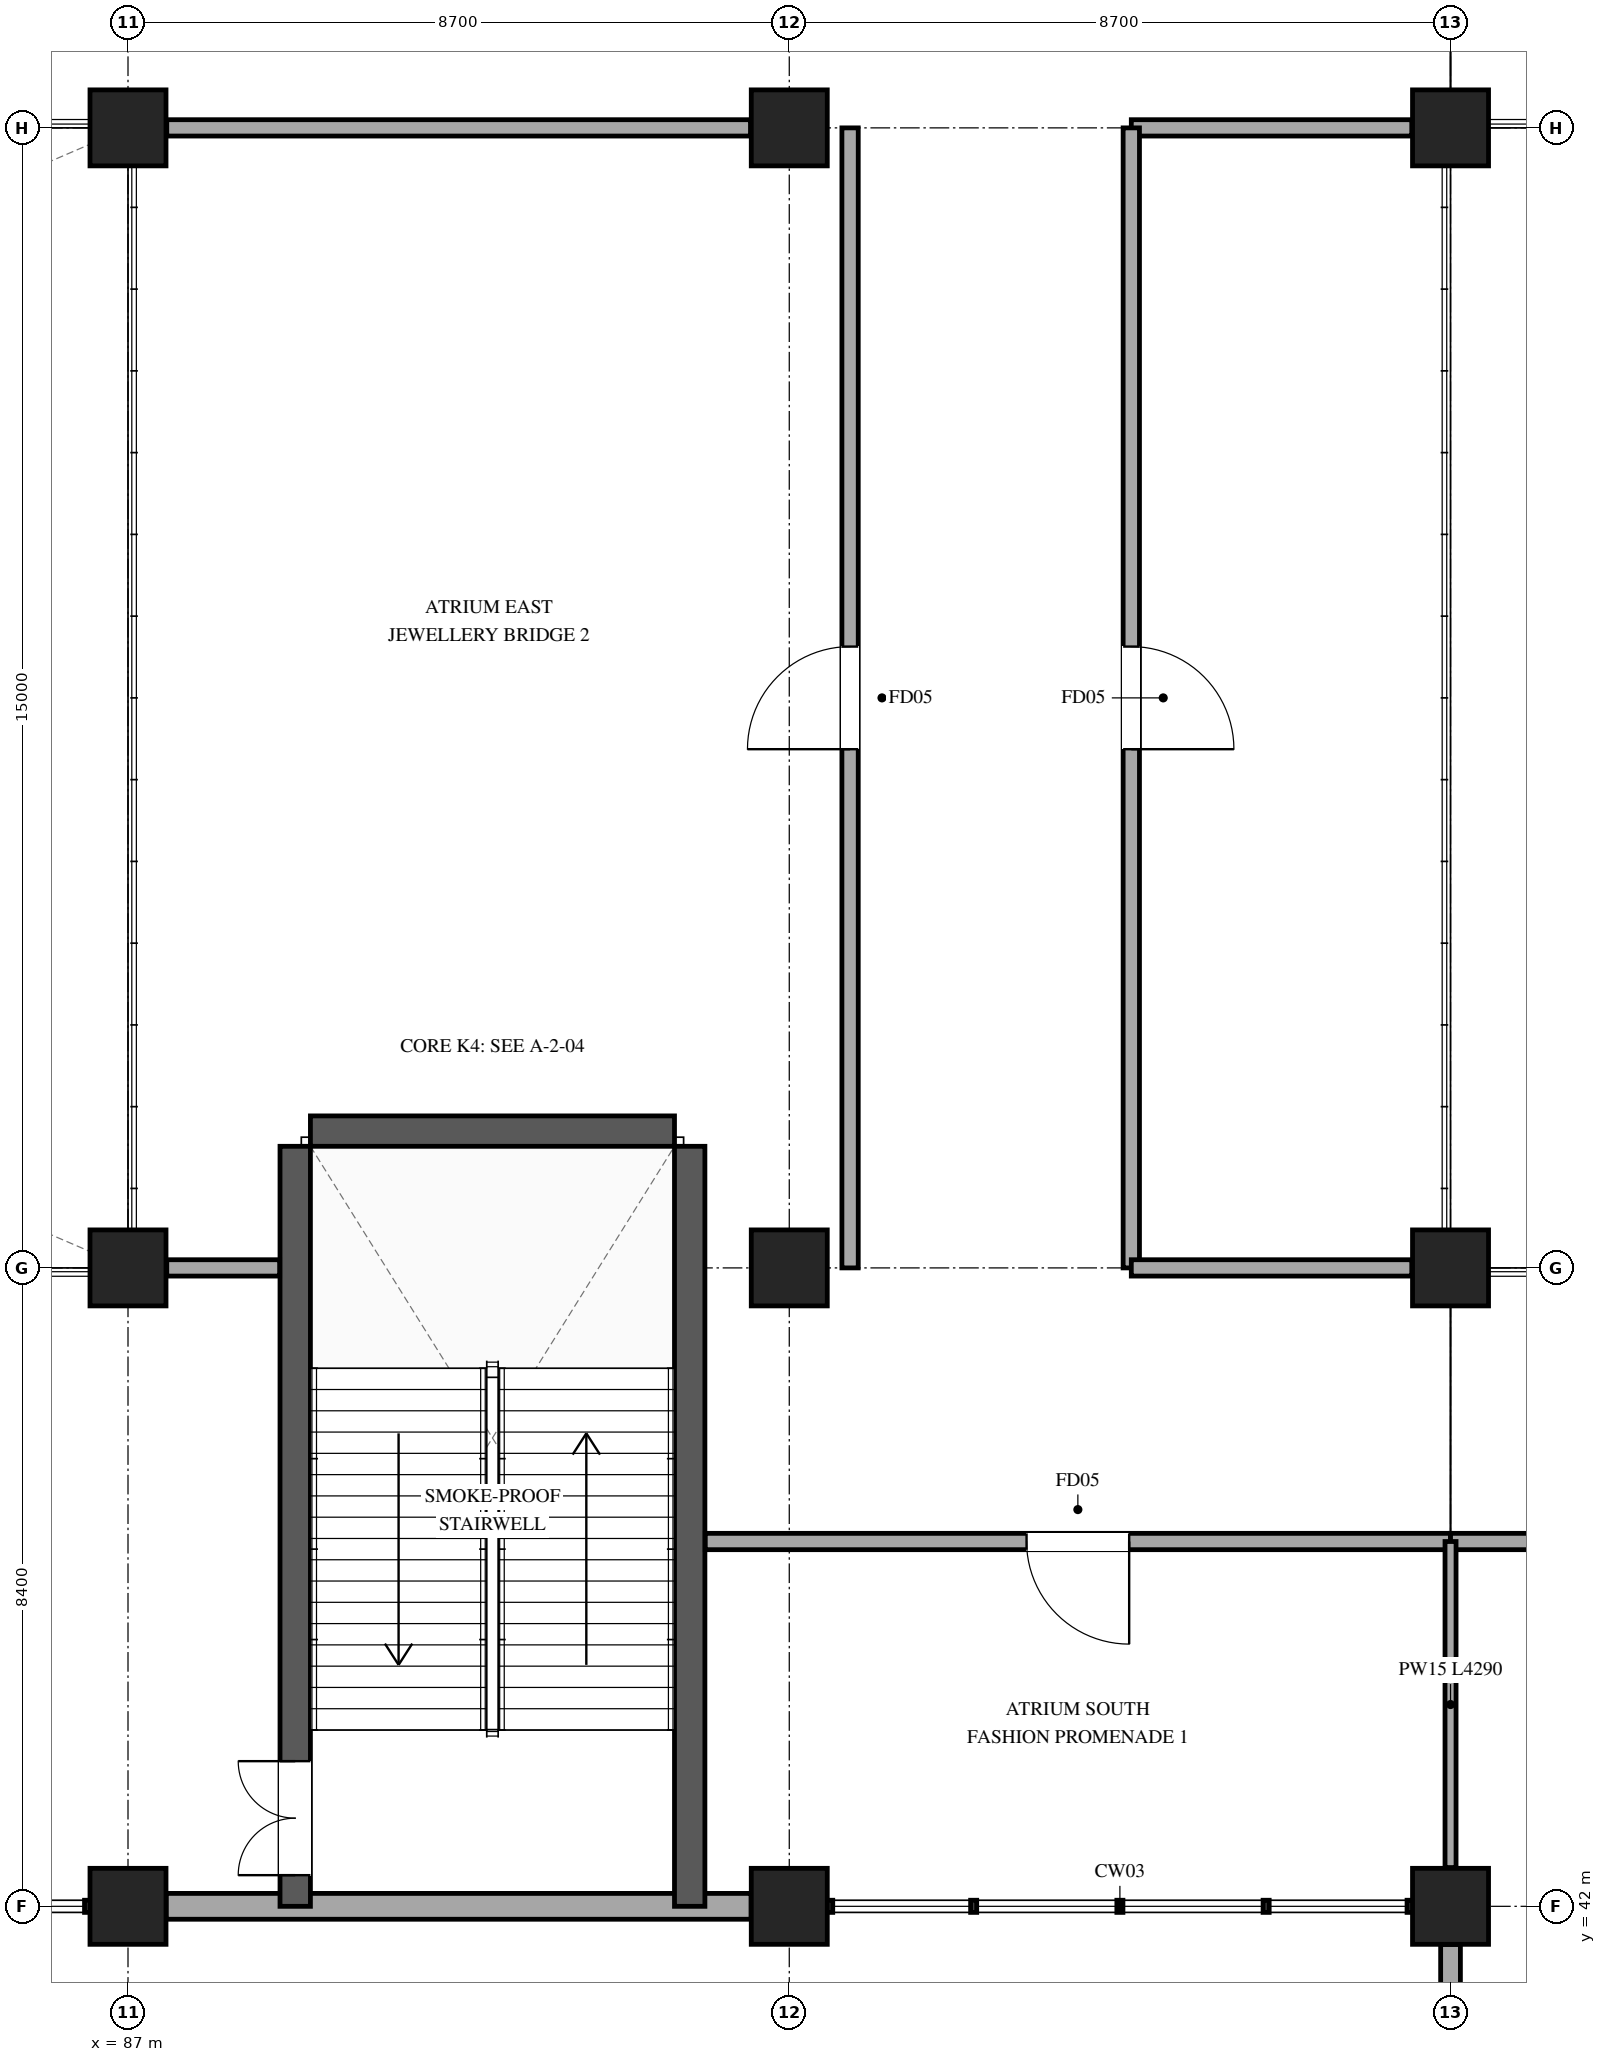
"""IFC4 building model, lengths in metres.
Left out: names, types, materials, properties, quantities, classifications, styles, units other than length and angle.
Written with IfcOpenShell. Run it as: python <this file> out.ifc"""

import sys

from ifc_helpers import new_model, si_unit, direction, frame, frame_2d, origin, origin_2d, place, context, subcontext, project, spatial, rectangle, extrude, element, fill, save


model = new_model("IFC4")
c1 = context("Model", 3, precision=1e-05, world=origin(), true_north=direction((0.0, 1.0)))
c2 = subcontext(c1, "Body", "Model", "MODEL_VIEW")
j1 = project(units=[si_unit("LENGTHUNIT", "METRE"), si_unit("PLANEANGLEUNIT", "RADIAN")], contexts=[c1])
p1 = place(None, origin())
s1 = spatial("IfcSite", under=j1, at=p1, CompositionType="ELEMENT")
p2 = place(p1, origin())
s2 = spatial("IfcBuilding", under=s1, at=p2, CompositionType="ELEMENT")
p3 = place(p2, frame((0.0, 0.0, 6.0)))
s3 = spatial("IfcBuildingStorey", under=s2, at=p3, CompositionType="ELEMENT", Elevation=6.0)
for number, where, z_axis, x_axis in (
    (1, (87.0, 42.0, 0.0), (0.0, 0.0, 1.0), (1.0, 0.0, 0.0)),
    (2, (87.0, 50.4, 0.0), (0.0, 0.0, 1.0), (1.0, 0.0, 0.0)),
    (3, (87.0, 65.4, 0.0), (0.0, 0.0, 1.0), (1.0, 0.0, 0.0)),
    (4, (95.7, 42.0, 0.0), (0.0, 0.0, 1.0), (1.0, 0.0, 0.0)),
    (5, (95.7, 50.4, 0.0), (0.0, 0.0, 1.0), (1.0, 0.0, 0.0)),
    (6, (95.7, 65.4, 0.0), (0.0, 0.0, 1.0), (1.0, 0.0, 0.0)),
    (7, (104.4, 42.0, 0.0), (0.0, 0.0, 1.0), (1.0, 0.0, 0.0)),
    (8, (104.4, 50.4, 0.0), (0.0, 0.0, 1.0), (1.0, 0.0, 0.0)),
    (9, (104.4, 65.4, 0.0), (0.0, 0.0, 1.0), (1.0, 0.0, 0.0)),
):
    element("IfcColumn", number, at=place(p3, frame(where, z_axis=z_axis, x_axis=x_axis)), inside=s3, PredefinedType="COLUMN", context=c2, shape_type="SweptSolid", body=[
        extrude(rectangle(XDim=1.0, YDim=1.0, at=origin_2d()), origin(), (0.0, 0.0, 1.0), 5.4),
    ])
p4 = place(p3, frame((104.4, 34.052, 0.0), z_axis=(0.0, 0.0, 1.0), x_axis=(0.0, 1.0, 0.0)))
e10 = element("IfcWall", 10, at=p4, inside=s3, PredefinedType="STANDARD", context=c2, shape_type="SweptSolid", body=[
    extrude(rectangle(XDim=7.446, YDim=0.26, at=frame_2d((3.723, 0.0))), origin(), (0.0, 0.0, 1.0), 4.455),
])
p5 = place(p4, frame((2.323, 0.0, 0.85)))
e11 = element("IfcOpeningElement", 11, at=p5, cuts=e10, PredefinedType="OPENING", context=c2, shape_type="SweptSolid", body=[
    extrude(rectangle(XDim=2.8, YDim=1.65, at=frame_2d((1.4, 0.825))), frame((0.0, 0.14, 0.0), z_axis=(0.0, -1.0, 0.0), x_axis=(1.0, 0.0, 0.0)), (0.0, 0.0, 1.0), 0.28),
])
p6 = place(p3, frame((95.198, 42.0, 0.0), z_axis=(0.0, 0.0, 1.0), x_axis=(-1.0, 0.0, 0.0)))
e12 = element("IfcWall", 12, at=p6, inside=s3, PredefinedType="STANDARD", context=c2, shape_type="SweptSolid", body=[
    extrude(rectangle(XDim=7.696, YDim=0.34, at=frame_2d((3.848, 0.0))), origin(), (0.0, 0.0, 1.0), 5.09),
])
p7 = place(p3, frame((89.2, 42.0, 0.0), z_axis=(0.0, 0.0, 1.0), x_axis=(0.0, 1.0, 0.0)))
e13 = element("IfcWall", 13, at=p7, inside=s3, PredefinedType="SHEAR", context=c2, shape_type="SweptSolid", body=[
    extrude(rectangle(XDim=10.0, YDim=0.4, at=frame_2d((5.0, 0.0))), origin(), (0.0, 0.0, 1.0), 5.4),
])
p8 = place(p7, frame((0.41, 0.0, 0.0)))
e14 = element("IfcOpeningElement", 14, at=p8, cuts=e13, PredefinedType="OPENING", context=c2, shape_type="SweptSolid", body=[
    extrude(rectangle(XDim=1.5, YDim=2.2, at=frame_2d((0.75, 1.1))), frame((0.0, 0.21, 0.0), z_axis=(0.0, -1.0, 0.0), x_axis=(1.0, 0.0, 0.0)), (0.0, 0.0, 1.0), 0.42),
])
p9 = place(p3, frame((94.39, 52.0, 0.0), z_axis=(0.0, 0.0, 1.0), x_axis=(0.0, -1.0, 0.0)))
e15 = element("IfcWall", 15, at=p9, inside=s3, PredefinedType="SHEAR", context=c2, shape_type="SweptSolid", body=[
    extrude(rectangle(XDim=10.0, YDim=0.4, at=frame_2d((5.0, 0.0))), origin(), (0.0, 0.0, 1.0), 5.4),
])
p10 = place(p3, frame((89.4, 52.2, 0.0), z_axis=(0.0, 0.0, 1.0), x_axis=(1.0, 0.0, 0.0)))
e16 = element("IfcWall", 16, at=p10, inside=s3, PredefinedType="SHEAR", context=c2, shape_type="SweptSolid", body=[
    extrude(rectangle(XDim=4.79, YDim=0.4, at=frame_2d((2.395, 0.0))), origin(), (0.0, 0.0, 1.0), 5.4),
])
p11 = place(p3, frame((104.4, 46.8, 0.0), z_axis=(0.0, 0.0, 1.0), x_axis=(-1.0, 0.0, 0.0)))
e17 = element("IfcWall", 17, at=p11, inside=s3, PredefinedType="PARTITIONING", context=c2, shape_type="SweptSolid", body=[
    extrude(rectangle(XDim=9.805, YDim=0.215, at=frame_2d((4.902, 0.0))), origin(), (0.0, 0.0, 1.0), 4.31),
])
p12 = place(p11, frame((4.228, 0.0, 0.0)))
e18 = element("IfcOpeningElement", 18, at=p12, cuts=e17, PredefinedType="OPENING", context=c2, shape_type="SweptSolid", body=[
    extrude(rectangle(XDim=1.35, YDim=2.2, at=frame_2d((0.675, 1.1))), frame((0.0, 0.118, 0.0), z_axis=(0.0, -1.0, 0.0), x_axis=(1.0, 0.0, 0.0)), (0.0, 0.0, 1.0), 0.235),
])
p13 = place(p3, frame((103.89, 65.4, 0.0), z_axis=(0.0, 0.0, 1.0), x_axis=(-1.0, 0.0, 0.0)))
e19 = element("IfcWall", 19, at=p13, inside=s3, PredefinedType="PARTITIONING", context=c2, shape_type="SweptSolid", body=[
    extrude(rectangle(XDim=3.69, YDim=0.215, at=frame_2d((1.845, 0.0))), origin(), (0.0, 0.0, 1.0), 4.31),
])
p14 = place(p3, frame((100.2, 65.4, 0.0), z_axis=(0.0, 0.0, 1.0), x_axis=(0.0, -1.0, 0.0)))
e20 = element("IfcWall", 20, at=p14, inside=s3, PredefinedType="PARTITIONING", context=c2, shape_type="SweptSolid", body=[
    extrude(rectangle(XDim=15.0, YDim=0.215, at=frame_2d((7.5, 0.0))), origin(), (0.0, 0.0, 1.0), 4.31),
])
p15 = place(p14, frame((6.825, 0.0, 0.0)))
e21 = element("IfcOpeningElement", 21, at=p15, cuts=e20, PredefinedType="OPENING", context=c2, shape_type="SweptSolid", body=[
    extrude(rectangle(XDim=1.35, YDim=2.2, at=frame_2d((0.675, 1.1))), frame((0.0, 0.118, 0.0), z_axis=(0.0, -1.0, 0.0), x_axis=(1.0, 0.0, 0.0)), (0.0, 0.0, 1.0), 0.235),
])
p16 = place(p3, frame((100.2, 50.4, 0.0), z_axis=(0.0, 0.0, 1.0), x_axis=(1.0, 0.0, 0.0)))
e22 = element("IfcWall", 22, at=p16, inside=s3, PredefinedType="PARTITIONING", context=c2, shape_type="SweptSolid", body=[
    extrude(rectangle(XDim=3.69, YDim=0.215, at=frame_2d((1.845, 0.0))), origin(), (0.0, 0.0, 1.0), 4.31),
])
p17 = place(p3, frame((87.51, 50.4, 0.0), z_axis=(0.0, 0.0, 1.0), x_axis=(1.0, 0.0, 0.0)))
e23 = element("IfcWall", 23, at=p17, inside=s3, PredefinedType="PARTITIONING", context=c2, shape_type="SweptSolid", body=[
    extrude(rectangle(XDim=1.485, YDim=0.215, at=frame_2d((0.743, 0.0))), origin(), (0.0, 0.0, 1.0), 5.06),
])
p18 = place(p3, frame((96.5, 50.4, 0.0), z_axis=(0.0, 0.0, 1.0), x_axis=(0.0, 1.0, 0.0)))
e24 = element("IfcWall", 24, at=p18, inside=s3, PredefinedType="PARTITIONING", context=c2, shape_type="SweptSolid", body=[
    extrude(rectangle(XDim=15.0, YDim=0.215, at=frame_2d((7.5, 0.0))), origin(), (0.0, 0.0, 1.0), 4.31),
])
p19 = place(p18, frame((6.825, 0.0, 0.0)))
e25 = element("IfcOpeningElement", 25, at=p19, cuts=e24, PredefinedType="OPENING", context=c2, shape_type="SweptSolid", body=[
    extrude(rectangle(XDim=1.35, YDim=2.2, at=frame_2d((0.675, 1.1))), frame((0.0, 0.118, 0.0), z_axis=(0.0, -1.0, 0.0), x_axis=(1.0, 0.0, 0.0)), (0.0, 0.0, 1.0), 0.235),
])
p20 = place(p3, frame((95.19, 65.4, 0.0), z_axis=(0.0, 0.0, 1.0), x_axis=(-1.0, 0.0, 0.0)))
e26 = element("IfcWall", 26, at=p20, inside=s3, PredefinedType="PARTITIONING", context=c2, shape_type="SweptSolid", body=[
    extrude(rectangle(XDim=7.68, YDim=0.215, at=frame_2d((3.84, 0.0))), origin(), (0.0, 0.0, 1.0), 4.31),
])
p21 = place(p3, frame((114.0, 46.8, 0.0), z_axis=(0.0, 0.0, 1.0), x_axis=(-1.0, 0.0, 0.0)))
e27 = element("IfcWall", 27, at=p21, inside=s3, PredefinedType="PARTITIONING", context=c2, shape_type="SweptSolid", body=[
    extrude(rectangle(XDim=9.6, YDim=0.215, at=frame_2d((4.8, 0.0))), origin(), (0.0, 0.0, 1.0), 4.31),
])
p22 = place(p3, frame((104.4, 46.8, 0.0), z_axis=(0.0, 0.0, 1.0), x_axis=(0.0, -1.0, 0.0)))
e28 = element("IfcWall", 28, at=p22, inside=s3, PredefinedType="PARTITIONING", context=c2, shape_type="SweptSolid", body=[
    extrude(rectangle(XDim=4.29, YDim=0.145, at=frame_2d((2.145, 0.0))), origin(), (0.0, 0.0, 1.0), 4.31),
])
p23 = place(p8, origin())
e29 = element("IfcDoor", 29, at=p23, inside=s3, OperationType="DOUBLE_DOOR_SINGLE_SWING", PredefinedType="DOOR", context=c2, shape_type="SweptSolid", body=[
    extrude(rectangle(XDim=1.5, YDim=2.2, at=frame_2d((0.75, 1.1))), frame((0.0, 0.025, 0.0), z_axis=(0.0, -1.0, 0.0), x_axis=(1.0, 0.0, 0.0)), (0.0, 0.0, 1.0), 0.05),
])
fill(e14, e29)
p24 = place(p12, origin())
e30 = element("IfcDoor", 30, at=p24, inside=s3, OperationType="SINGLE_SWING_LEFT", PredefinedType="DOOR", context=c2, shape_type="SweptSolid", body=[
    extrude(rectangle(XDim=1.35, YDim=2.2, at=frame_2d((0.675, 1.1))), frame((0.0, 0.025, 0.0), z_axis=(0.0, -1.0, 0.0), x_axis=(1.0, 0.0, 0.0)), (0.0, 0.0, 1.0), 0.05),
])
fill(e18, e30)
p25 = place(p15, origin())
e31 = element("IfcDoor", 31, at=p25, inside=s3, OperationType="SINGLE_SWING_RIGHT", PredefinedType="DOOR", context=c2, shape_type="SweptSolid", body=[
    extrude(rectangle(XDim=1.35, YDim=2.2, at=frame_2d((0.675, 1.1))), frame((0.0, 0.025, 0.0), z_axis=(0.0, -1.0, 0.0), x_axis=(1.0, 0.0, 0.0)), (0.0, 0.0, 1.0), 0.05),
])
fill(e21, e31)
p26 = place(p19, origin())
e32 = element("IfcDoor", 32, at=p26, inside=s3, OperationType="SINGLE_SWING_LEFT", PredefinedType="DOOR", context=c2, shape_type="SweptSolid", body=[
    extrude(rectangle(XDim=1.35, YDim=2.2, at=frame_2d((0.675, 1.1))), frame((0.0, 0.025, 0.0), z_axis=(0.0, -1.0, 0.0), x_axis=(1.0, 0.0, 0.0)), (0.0, 0.0, 1.0), 0.05),
])
fill(e25, e32)
save(model, sys.argv[1])
